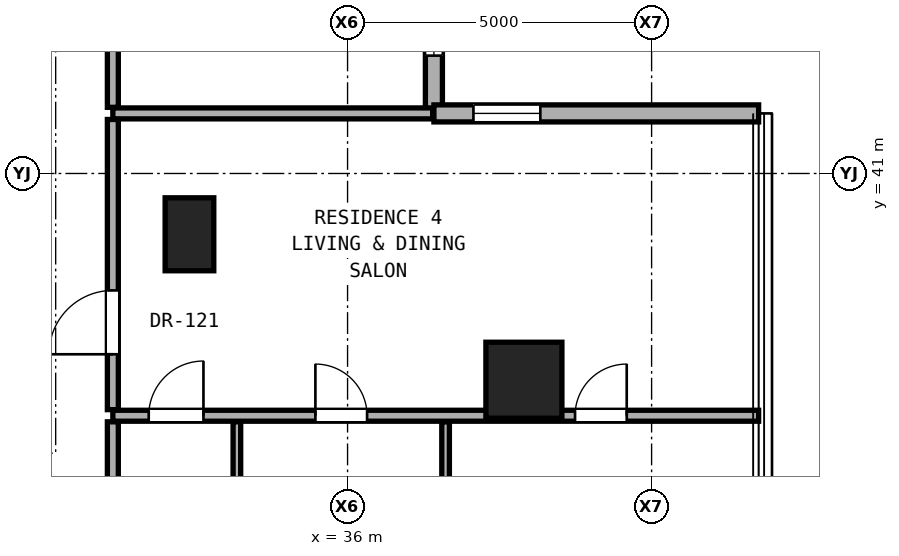
"""IFC4 building model, lengths in metres.
Left out: names, types, materials, properties, quantities, classifications, styles, units other than length and angle.
Written with IfcOpenShell. Run it as: python <this file> out.ifc"""

import sys

from ifc_helpers import new_model, si_unit, direction, frame, frame_2d, origin, origin_2d, place, context, subcontext, project, spatial, rectangle, hollow_rectangle, extrude, element, fill, save


model = new_model("IFC4")
c1 = context("Model", 3, precision=1e-05, world=origin(), true_north=direction((0.0, 1.0)))
c2 = subcontext(c1, "Body", "Model", "MODEL_VIEW")
j1 = project(units=[si_unit("LENGTHUNIT", "METRE"), si_unit("PLANEANGLEUNIT", "RADIAN")], contexts=[c1])
p1 = place(None, origin())
s1 = spatial("IfcSite", under=j1, at=p1, CompositionType="ELEMENT")
p2 = place(p1, origin())
s2 = spatial("IfcBuilding", under=s1, at=p2, CompositionType="ELEMENT")
p3 = place(p2, frame((0.0, 0.0, 71.9)))
s3 = spatial("IfcBuildingStorey", under=s2, at=p3, CompositionType="ELEMENT", Elevation=71.9)
p4 = place(p3, frame((38.9, 37.6, 0.0), z_axis=(0.0, 0.0, 1.0), x_axis=(1.0, 0.0, 0.0)))
e1 = element("IfcColumn", 1, at=p4, inside=s3, PredefinedType="COLUMN", context=c2, shape_type="SweptSolid", body=[
    extrude(hollow_rectangle(XDim=1.25, YDim=1.25, WallThickness=0.07, at=origin_2d()), origin(), (0.0, 0.0, 1.0), 3.3),
])
p5 = place(p3, frame((33.4, 40.0, 0.0), z_axis=(0.0, 0.0, 1.0), x_axis=(1.0, 0.0, 0.0)))
e2 = element("IfcColumn", 2, at=p5, inside=s3, PredefinedType="PILASTER", context=c2, shape_type="SweptSolid", body=[
    extrude(rectangle(XDim=0.8, YDim=1.2, at=origin_2d()), origin(), (0.0, 0.0, 1.0), 3.3),
])
p6 = place(p3, frame((37.42, 41.988, 0.0), z_axis=(0.0, 0.0, 1.0), x_axis=(0.0, 1.0, 0.0)))
e3 = element("IfcWall", 3, at=p6, inside=s3, PredefinedType="SOLIDWALL", context=c2, shape_type="SweptSolid", body=[
    extrude(rectangle(XDim=5.34, YDim=0.28, at=frame_2d((2.67, 0.0))), origin(), (0.0, 0.0, 1.0), 3.04),
])
p7 = place(p6, frame((0.95, 0.0, 0.85)))
e4 = element("IfcOpeningElement", 4, at=p7, cuts=e3, PredefinedType="OPENING", context=c2, shape_type="SweptSolid", body=[
    extrude(rectangle(XDim=1.1, YDim=2.0, at=frame_2d((0.55, 1.0))), frame((0.0, 0.15, 0.0), z_axis=(0.0, -1.0, 0.0), x_axis=(1.0, 0.0, 0.0)), (0.0, 0.0, 1.0), 0.3),
])
p8 = place(p3, frame((42.76, 41.988, 0.0), z_axis=(0.0, 0.0, 1.0), x_axis=(-1.0, 0.0, 0.0)))
e5 = element("IfcWall", 5, at=p8, inside=s3, PredefinedType="SOLIDWALL", context=c2, shape_type="SweptSolid", body=[
    extrude(rectangle(XDim=5.34, YDim=0.28, at=frame_2d((2.67, 0.0))), origin(), (0.0, 0.0, 1.0), 3.04),
])
p9 = place(p8, frame((3.59, 0.0, 0.85)))
e6 = element("IfcOpeningElement", 6, at=p9, cuts=e5, PredefinedType="OPENING", context=c2, shape_type="SweptSolid", body=[
    extrude(rectangle(XDim=1.1, YDim=2.0, at=frame_2d((0.55, 1.0))), frame((0.0, 0.15, 0.0), z_axis=(0.0, -1.0, 0.0), x_axis=(1.0, 0.0, 0.0)), (0.0, 0.0, 1.0), 0.3),
])
p10 = place(p3, frame((32.14, 37.016, 0.0), z_axis=(0.0, 0.0, 1.0), x_axis=(1.0, 0.0, 0.0)))
e7 = element("IfcWall", 7, at=p10, inside=s3, PredefinedType="PARTITIONING", context=c2, shape_type="SweptSolid", body=[
    extrude(rectangle(XDim=10.62, YDim=0.18, at=frame_2d((5.31, 0.0))), origin(), (0.0, 0.0, 1.0), 2.125),
])
p11 = place(p10, frame((7.601, 0.0, 0.0)))
e8 = element("IfcOpeningElement", 8, at=p11, cuts=e7, PredefinedType="OPENING", context=c2, shape_type="SweptSolid", body=[
    extrude(rectangle(XDim=0.85, YDim=2.01, at=frame_2d((0.425, 1.005))), frame((0.0, 0.1, 0.0), z_axis=(0.0, -1.0, 0.0), x_axis=(1.0, 0.0, 0.0)), (0.0, 0.0, 1.0), 0.2),
])
p12 = place(p10, frame((3.331, 0.0, 0.0)))
e9 = element("IfcOpeningElement", 9, at=p12, cuts=e7, PredefinedType="OPENING", context=c2, shape_type="SweptSolid", body=[
    extrude(rectangle(XDim=0.85, YDim=2.01, at=frame_2d((0.425, 1.005))), frame((0.0, 0.1, 0.0), z_axis=(0.0, -1.0, 0.0), x_axis=(1.0, 0.0, 0.0)), (0.0, 0.0, 1.0), 0.2),
])
p13 = place(p10, frame((0.59, 0.0, 0.0)))
e10 = element("IfcOpeningElement", 10, at=p13, cuts=e7, PredefinedType="OPENING", context=c2, shape_type="SweptSolid", body=[
    extrude(rectangle(XDim=0.9, YDim=2.1, at=frame_2d((0.45, 1.05))), frame((0.0, 0.1, 0.0), z_axis=(0.0, -1.0, 0.0), x_axis=(1.0, 0.0, 0.0)), (0.0, 0.0, 1.0), 0.2),
])
p14 = place(p3, frame((32.14, 41.988, 0.0), z_axis=(0.0, 0.0, 1.0), x_axis=(1.0, 0.0, 0.0)))
e11 = element("IfcWall", 11, at=p14, inside=s3, PredefinedType="PARTITIONING", context=c2, shape_type="SweptSolid", body=[
    extrude(rectangle(XDim=5.26, YDim=0.18, at=frame_2d((2.63, 0.0))), origin(), (0.0, 0.0, 1.0), 3.06),
])
p15 = place(p3, frame((32.14, 34.368, 0.0), z_axis=(0.0, 0.0, 1.0), x_axis=(0.0, 1.0, 0.0)))
e12 = element("IfcWall", 12, at=p15, inside=s3, PredefinedType="PARTITIONING", context=c2, shape_type="SweptSolid", body=[
    extrude(rectangle(XDim=2.548, YDim=0.18, at=frame_2d((1.274, 0.0))), origin(), (0.0, 0.0, 1.0), 3.06),
])
p16 = place(p3, frame((32.14, 37.116, 0.0), z_axis=(0.0, 0.0, 1.0), x_axis=(0.0, 1.0, 0.0)))
e13 = element("IfcWall", 13, at=p16, inside=s3, PredefinedType="PARTITIONING", context=c2, shape_type="SweptSolid", body=[
    extrude(rectangle(XDim=4.772, YDim=0.18, at=frame_2d((2.386, 0.0))), origin(), (0.0, 0.0, 1.0), 2.436),
])
p17 = place(p16, frame((0.911, 0.0, 0.0)))
e14 = element("IfcOpeningElement", 14, at=p17, cuts=e13, PredefinedType="OPENING", context=c2, shape_type="SweptSolid", body=[
    extrude(rectangle(XDim=1.05, YDim=2.2, at=frame_2d((0.525, 1.1))), frame((0.0, 0.1, 0.0), z_axis=(0.0, -1.0, 0.0), x_axis=(1.0, 0.0, 0.0)), (0.0, 0.0, 1.0), 0.2),
])
p18 = place(p3, frame((32.14, 42.088, 0.0), z_axis=(0.0, 0.0, 1.0), x_axis=(0.0, 1.0, 0.0)))
e15 = element("IfcWall", 15, at=p18, inside=s3, PredefinedType="PARTITIONING", context=c2, shape_type="SweptSolid", body=[
    extrude(rectangle(XDim=5.24, YDim=0.18, at=frame_2d((2.62, 0.0))), origin(), (0.0, 0.0, 1.0), 3.06),
])
p19 = place(p18, frame((2.145, 0.0, 0.0)))
e16 = element("IfcOpeningElement", 16, at=p19, cuts=e15, PredefinedType="OPENING", context=c2, shape_type="SweptSolid", body=[
    extrude(rectangle(XDim=0.95, YDim=2.15, at=frame_2d((0.475, 1.075))), frame((0.0, 0.1, 0.0), z_axis=(0.0, -1.0, 0.0), x_axis=(1.0, 0.0, 0.0)), (0.0, 0.0, 1.0), 0.2),
])
for number, where, z_axis, x_axis in (
    (17, (34.18, 34.368, 0.0), (0.0, 0.0, 1.0), (0.0, 1.0, 0.0)),
    (18, (37.612, 34.368, 0.0), (0.0, 0.0, 1.0), (0.0, 1.0, 0.0)),
):
    element("IfcWall", number, at=place(p3, frame(where, z_axis=z_axis, x_axis=x_axis)), inside=s3, PredefinedType="PARTITIONING", context=c2, shape_type="SweptSolid", body=[
        extrude(rectangle(XDim=2.548, YDim=0.125, at=frame_2d((1.274, 0.0))), origin(), (0.0, 0.0, 1.0), 3.06),
    ])
p20 = place(p7, origin())
e19 = element("IfcWindow", 19, at=p20, inside=s3, PartitioningType="SINGLE_PANEL", PredefinedType="WINDOW", context=c2, shape_type="SweptSolid", body=[
    extrude(rectangle(XDim=1.1, YDim=2.0, at=frame_2d((0.55, 1.0))), frame((0.0, 0.03, 0.0), z_axis=(0.0, -1.0, 0.0), x_axis=(1.0, 0.0, 0.0)), (0.0, 0.0, 1.0), 0.06),
])
fill(e4, e19)
p21 = place(p9, origin())
e20 = element("IfcWindow", 20, at=p21, inside=s3, PartitioningType="SINGLE_PANEL", PredefinedType="WINDOW", context=c2, shape_type="SweptSolid", body=[
    extrude(rectangle(XDim=1.1, YDim=2.0, at=frame_2d((0.55, 1.0))), frame((0.0, 0.03, 0.0), z_axis=(0.0, -1.0, 0.0), x_axis=(1.0, 0.0, 0.0)), (0.0, 0.0, 1.0), 0.06),
])
fill(e6, e20)
p22 = place(p17, origin())
e21 = element("IfcDoor", 21, at=p22, inside=s3, OperationType="SINGLE_SWING_LEFT", PredefinedType="DOOR", context=c2, shape_type="SweptSolid", body=[
    extrude(rectangle(XDim=1.05, YDim=2.2, at=frame_2d((0.525, 1.1))), frame((0.0, 0.025, 0.0), z_axis=(0.0, -1.0, 0.0), x_axis=(1.0, 0.0, 0.0)), (0.0, 0.0, 1.0), 0.05),
])
fill(e14, e21)
p23 = place(p11, origin())
e22 = element("IfcDoor", 22, at=p23, inside=s3, OperationType="SINGLE_SWING_RIGHT", PredefinedType="DOOR", context=c2, shape_type="SweptSolid", body=[
    extrude(rectangle(XDim=0.85, YDim=2.01, at=frame_2d((0.425, 1.005))), frame((0.0, 0.025, 0.0), z_axis=(0.0, -1.0, 0.0), x_axis=(1.0, 0.0, 0.0)), (0.0, 0.0, 1.0), 0.05),
])
fill(e8, e22)
p24 = place(p12, origin())
e23 = element("IfcDoor", 23, at=p24, inside=s3, OperationType="SINGLE_SWING_LEFT", PredefinedType="DOOR", context=c2, shape_type="SweptSolid", body=[
    extrude(rectangle(XDim=0.85, YDim=2.01, at=frame_2d((0.425, 1.005))), frame((0.0, 0.025, 0.0), z_axis=(0.0, -1.0, 0.0), x_axis=(1.0, 0.0, 0.0)), (0.0, 0.0, 1.0), 0.05),
])
fill(e9, e23)
p25 = place(p13, origin())
e24 = element("IfcDoor", 24, at=p25, inside=s3, OperationType="SINGLE_SWING_RIGHT", PredefinedType="DOOR", context=c2, shape_type="SweptSolid", body=[
    extrude(rectangle(XDim=0.9, YDim=2.1, at=frame_2d((0.45, 1.05))), frame((0.0, 0.025, 0.0), z_axis=(0.0, -1.0, 0.0), x_axis=(1.0, 0.0, 0.0)), (0.0, 0.0, 1.0), 0.05),
])
fill(e10, e24)
save(model, sys.argv[1])
